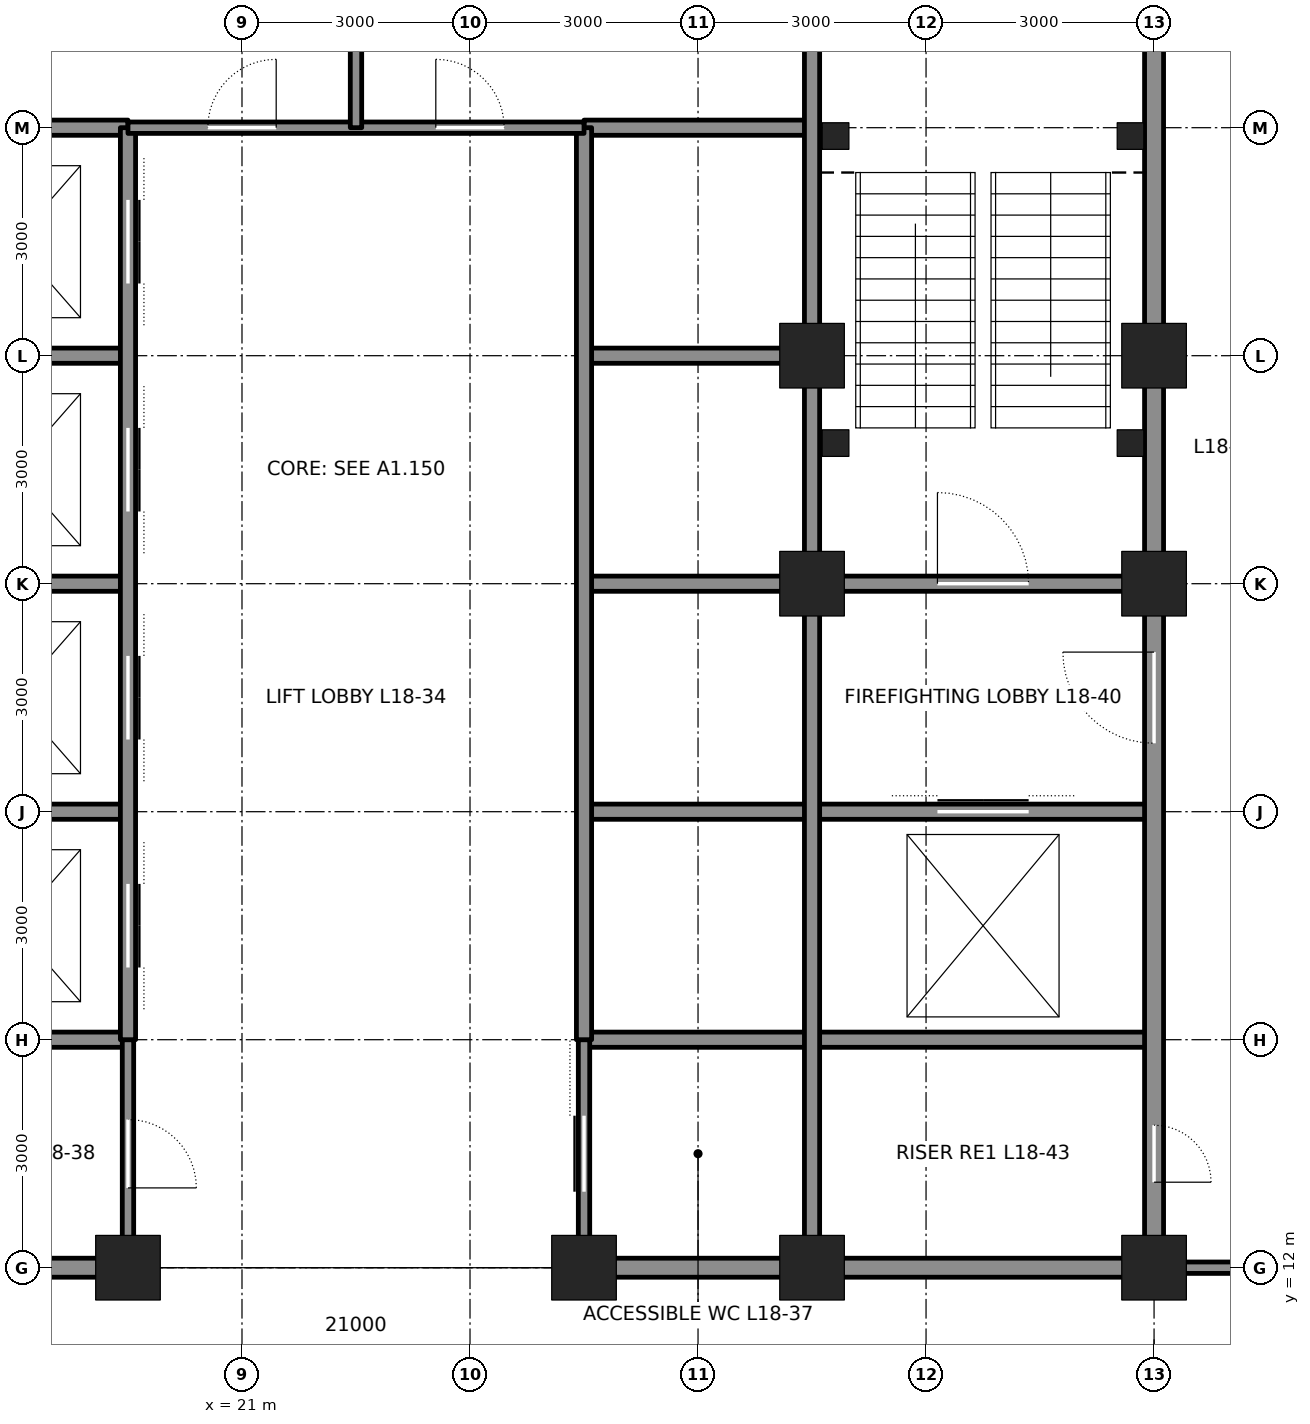
"""IFC4 building model, lengths in metres.
Left out: names, types, materials, properties, quantities, classifications, styles, units other than length and angle.
Written with IfcOpenShell. Run it as: python <this file> out.ifc"""

import sys

from ifc_helpers import new_model, si_unit, direction, frame, frame_2d, origin, origin_2d, place, context, subcontext, project, spatial, rectangle, hollow_rectangle, extrude, element, fill, save


model = new_model("IFC4")
c1 = context("Model", 3, precision=1e-05, world=origin(), true_north=direction((0.0, 1.0)))
c2 = subcontext(c1, "Body", "Model", "MODEL_VIEW")
j1 = project(units=[si_unit("LENGTHUNIT", "METRE"), si_unit("PLANEANGLEUNIT", "RADIAN")], contexts=[c1])
p1 = place(None, origin())
s1 = spatial("IfcSite", under=j1, at=p1, CompositionType="ELEMENT")
p2 = place(p1, origin())
s2 = spatial("IfcBuilding", under=s1, at=p2, CompositionType="ELEMENT")
p3 = place(p2, frame((0.0, 0.0, 87.3)))
s3 = spatial("IfcBuildingStorey", under=s2, at=p3, CompositionType="ELEMENT", Elevation=87.3)
for number, where, z_axis, x_axis in (
    (1, (19.5, 12.0, 0.0), (0.0, 0.0, 1.0), (1.0, 0.0, 0.0)),
    (2, (25.5, 12.0, 0.0), (0.0, 0.0, 1.0), (1.0, 0.0, 0.0)),
    (3, (28.5, 12.0, 0.0), (0.0, 0.0, 1.0), (1.0, 0.0, 0.0)),
    (4, (33.0, 12.0, 0.0), (0.0, 0.0, 1.0), (1.0, 0.0, 0.0)),
    (5, (33.0, 21.0, 0.0), (0.0, 0.0, 1.0), (1.0, 0.0, 0.0)),
    (6, (33.0, 24.0, 0.0), (0.0, 0.0, 1.0), (1.0, 0.0, 0.0)),
    (7, (28.5, 21.0, 0.0), (0.0, 0.0, 1.0), (1.0, 0.0, 0.0)),
    (8, (28.5, 24.0, 0.0), (0.0, 0.0, 1.0), (1.0, 0.0, 0.0)),
):
    element("IfcColumn", number, at=place(p3, frame(where, z_axis=z_axis, x_axis=x_axis)), inside=s3, PredefinedType="COLUMN", context=c2, shape_type="SweptSolid", body=[
        extrude(hollow_rectangle(XDim=0.85, YDim=0.85, WallThickness=0.085, at=origin_2d()), origin(), (0.0, 0.0, 1.0), 4.5),
    ])
for number, where, z_axis, x_axis in (
    (9, (16.75, 12.0, 0.0), (0.0, 0.0, 1.0), (1.0, 0.0, 0.0)),
    (10, (25.75, 12.0, 0.0), (0.0, 0.0, 1.0), (1.0, 0.0, 0.0)),
):
    element("IfcWall", number, at=place(p3, frame(where, z_axis=z_axis, x_axis=x_axis)), inside=s3, PredefinedType="SOLIDWALL", context=c2, shape_type="SweptSolid", body=[
        extrude(rectangle(XDim=2.5, YDim=0.25, at=frame_2d((1.25, 0.0))), origin(), (0.0, 0.0, 1.0), 3.181),
    ])
p4 = place(p3, frame((28.75, 12.0, 0.0), z_axis=(0.0, 0.0, 1.0), x_axis=(1.0, 0.0, 0.0)))
e11 = element("IfcWall", 11, at=p4, inside=s3, PredefinedType="SOLIDWALL", context=c2, shape_type="SweptSolid", body=[
    extrude(rectangle(XDim=4.0, YDim=0.25, at=frame_2d((2.0, 0.0))), origin(), (0.0, 0.0, 1.0), 3.181),
])
for number, where, z_axis, x_axis in (
    (12, (12.0, 15.0, 0.0), (0.0, 0.0, 1.0), (1.0, 0.0, 0.0)),
    (13, (25.5, 15.0, 0.0), (0.0, 0.0, 1.0), (1.0, 0.0, 0.0)),
):
    element("IfcWall", number, at=place(p3, frame(where, z_axis=z_axis, x_axis=x_axis)), inside=s3, PredefinedType="SOLIDWALL", context=c2, shape_type="SweptSolid", body=[
        extrude(rectangle(XDim=7.5, YDim=0.2, at=frame_2d((3.75, 0.0))), origin(), (0.0, 0.0, 1.0), 4.34),
    ])
for number, where, z_axis, x_axis in (
    (14, (16.75, 24.0, 0.0), (0.0, 0.0, 1.0), (1.0, 0.0, 0.0)),
    (15, (25.5, 24.0, 0.0), (0.0, 0.0, 1.0), (1.0, 0.0, 0.0)),
):
    element("IfcWall", number, at=place(p3, frame(where, z_axis=z_axis, x_axis=x_axis)), inside=s3, PredefinedType="SOLIDWALL", context=c2, shape_type="SweptSolid", body=[
        extrude(rectangle(XDim=2.75, YDim=0.2, at=frame_2d((1.375, 0.0))), origin(), (0.0, 0.0, 1.0), 3.39),
    ])
p5 = place(p3, frame((12.0, 27.0, 0.0), z_axis=(0.0, 0.0, 1.0), x_axis=(1.0, 0.0, 0.0)))
e16 = element("IfcWall", 16, at=p5, inside=s3, PredefinedType="SOLIDWALL", context=c2, shape_type="SweptSolid", body=[
    extrude(rectangle(XDim=7.5, YDim=0.2, at=frame_2d((3.75, 0.0))), origin(), (0.0, 0.0, 1.0), 4.34),
])
p6 = place(p5, frame((1.65, 0.0, 0.0)))
e17 = element("IfcOpeningElement", 17, at=p6, cuts=e16, PredefinedType="OPENING", context=c2, shape_type="SweptSolid", body=[
    extrude(rectangle(XDim=1.2, YDim=2.1, at=frame_2d((0.6, 1.05))), frame((0.0, 0.11, 0.0), z_axis=(0.0, -1.0, 0.0), x_axis=(1.0, 0.0, 0.0)), (0.0, 0.0, 1.0), 0.22),
])
for number, where, z_axis, x_axis in (
    (18, (25.5, 27.0, 0.0), (0.0, 0.0, 1.0), (1.0, 0.0, 0.0)),
    (19, (16.5, 18.0, 0.0), (0.0, 0.0, 1.0), (1.0, 0.0, 0.0)),
):
    element("IfcWall", number, at=place(p3, frame(where, z_axis=z_axis, x_axis=x_axis)), inside=s3, PredefinedType="SOLIDWALL", context=c2, shape_type="SweptSolid", body=[
        extrude(rectangle(XDim=3.0, YDim=0.2, at=frame_2d((1.5, 0.0))), origin(), (0.0, 0.0, 1.0), 4.34),
    ])
p7 = place(p3, frame((25.5, 18.0, 0.0), z_axis=(0.0, 0.0, 1.0), x_axis=(1.0, 0.0, 0.0)))
e20 = element("IfcWall", 20, at=p7, inside=s3, PredefinedType="SOLIDWALL", context=c2, shape_type="SweptSolid", body=[
    extrude(rectangle(XDim=7.5, YDim=0.2, at=frame_2d((3.75, 0.0))), origin(), (0.0, 0.0, 1.0), 4.34),
])
p8 = place(p7, frame((4.65, 0.0, 0.0)))
e21 = element("IfcOpeningElement", 21, at=p8, cuts=e20, PredefinedType="OPENING", context=c2, shape_type="SweptSolid", body=[
    extrude(rectangle(XDim=1.2, YDim=2.1, at=frame_2d((0.6, 1.05))), frame((0.0, 0.11, 0.0), z_axis=(0.0, -1.0, 0.0), x_axis=(1.0, 0.0, 0.0)), (0.0, 0.0, 1.0), 0.22),
])
for number, where, z_axis, x_axis in (
    (22, (16.75, 21.0, 0.0), (0.0, 0.0, 1.0), (1.0, 0.0, 0.0)),
    (23, (25.5, 21.0, 0.0), (0.0, 0.0, 1.0), (1.0, 0.0, 0.0)),
):
    element("IfcWall", number, at=place(p3, frame(where, z_axis=z_axis, x_axis=x_axis)), inside=s3, PredefinedType="SOLIDWALL", context=c2, shape_type="SweptSolid", body=[
        extrude(rectangle(XDim=2.75, YDim=0.2, at=frame_2d((1.375, 0.0))), origin(), (0.0, 0.0, 1.0), 3.39),
    ])
p9 = place(p3, frame((28.75, 21.0, 0.0), z_axis=(0.0, 0.0, 1.0), x_axis=(1.0, 0.0, 0.0)))
e24 = element("IfcWall", 24, at=p9, inside=s3, PredefinedType="SOLIDWALL", context=c2, shape_type="SweptSolid", body=[
    extrude(rectangle(XDim=4.0, YDim=0.2, at=frame_2d((2.0, 0.0))), origin(), (0.0, 0.0, 1.0), 3.39),
])
p10 = place(p9, frame((1.4, 0.0, 0.0)))
e25 = element("IfcOpeningElement", 25, at=p10, cuts=e24, PredefinedType="OPENING", context=c2, shape_type="SweptSolid", body=[
    extrude(rectangle(XDim=1.2, YDim=2.1, at=frame_2d((0.6, 1.05))), frame((0.0, 0.11, 0.0), z_axis=(0.0, -1.0, 0.0), x_axis=(1.0, 0.0, 0.0)), (0.0, 0.0, 1.0), 0.22),
])
p11 = place(p3, frame((19.5, 12.25, 0.0), z_axis=(0.0, 0.0, 1.0), x_axis=(0.0, 1.0, 0.0)))
e26 = element("IfcWall", 26, at=p11, inside=s3, PredefinedType="PARTITIONING", context=c2, shape_type="SweptSolid", body=[
    extrude(rectangle(XDim=2.75, YDim=0.15, at=frame_2d((1.375, 0.0))), origin(), (0.0, 0.0, 1.0), 3.365),
])
p12 = place(p11, frame((0.8, 0.0, 0.0)))
e27 = element("IfcOpeningElement", 27, at=p12, cuts=e26, PredefinedType="OPENING", context=c2, shape_type="SweptSolid", body=[
    extrude(rectangle(XDim=0.9, YDim=2.1, at=frame_2d((0.45, 1.05))), frame((0.0, 0.085, 0.0), z_axis=(0.0, -1.0, 0.0), x_axis=(1.0, 0.0, 0.0)), (0.0, 0.0, 1.0), 0.17),
])
p13 = place(p3, frame((19.5, 15.0, 0.0), z_axis=(0.0, 0.0, 1.0), x_axis=(0.0, 1.0, 0.0)))
e28 = element("IfcWall", 28, at=p13, inside=s3, PredefinedType="SOLIDWALL", context=c2, shape_type="SweptSolid", body=[
    extrude(rectangle(XDim=12.0, YDim=0.2, at=frame_2d((6.0, 0.0))), origin(), (0.0, 0.0, 1.0), 3.365),
])
p14 = place(p13, frame((0.95, 0.0, 0.0)))
e29 = element("IfcOpeningElement", 29, at=p14, cuts=e28, PredefinedType="OPENING", context=c2, shape_type="SweptSolid", body=[
    extrude(rectangle(XDim=1.1, YDim=2.1, at=frame_2d((0.55, 1.05))), frame((0.0, 0.11, 0.0), z_axis=(0.0, -1.0, 0.0), x_axis=(1.0, 0.0, 0.0)), (0.0, 0.0, 1.0), 0.22),
])
p15 = place(p13, frame((3.95, 0.0, 0.0)))
e30 = element("IfcOpeningElement", 30, at=p15, cuts=e28, PredefinedType="OPENING", context=c2, shape_type="SweptSolid", body=[
    extrude(rectangle(XDim=1.1, YDim=2.1, at=frame_2d((0.55, 1.05))), frame((0.0, 0.11, 0.0), z_axis=(0.0, -1.0, 0.0), x_axis=(1.0, 0.0, 0.0)), (0.0, 0.0, 1.0), 0.22),
])
p16 = place(p13, frame((6.95, 0.0, 0.0)))
e31 = element("IfcOpeningElement", 31, at=p16, cuts=e28, PredefinedType="OPENING", context=c2, shape_type="SweptSolid", body=[
    extrude(rectangle(XDim=1.1, YDim=2.1, at=frame_2d((0.55, 1.05))), frame((0.0, 0.11, 0.0), z_axis=(0.0, -1.0, 0.0), x_axis=(1.0, 0.0, 0.0)), (0.0, 0.0, 1.0), 0.22),
])
p17 = place(p13, frame((9.95, 0.0, 0.0)))
e32 = element("IfcOpeningElement", 32, at=p17, cuts=e28, PredefinedType="OPENING", context=c2, shape_type="SweptSolid", body=[
    extrude(rectangle(XDim=1.1, YDim=2.1, at=frame_2d((0.55, 1.05))), frame((0.0, 0.11, 0.0), z_axis=(0.0, -1.0, 0.0), x_axis=(1.0, 0.0, 0.0)), (0.0, 0.0, 1.0), 0.22),
])
p18 = place(p3, frame((25.5, 12.25, 0.0), z_axis=(0.0, 0.0, 1.0), x_axis=(0.0, 1.0, 0.0)))
e33 = element("IfcWall", 33, at=p18, inside=s3, PredefinedType="PARTITIONING", context=c2, shape_type="SweptSolid", body=[
    extrude(rectangle(XDim=2.75, YDim=0.15, at=frame_2d((1.375, 0.0))), origin(), (0.0, 0.0, 1.0), 3.365),
])
p19 = place(p18, frame((0.75, 0.0, 0.0)))
e34 = element("IfcOpeningElement", 34, at=p19, cuts=e33, PredefinedType="OPENING", context=c2, shape_type="SweptSolid", body=[
    extrude(rectangle(XDim=1.0, YDim=2.1, at=frame_2d((0.5, 1.05))), frame((0.0, 0.085, 0.0), z_axis=(0.0, -1.0, 0.0), x_axis=(1.0, 0.0, 0.0)), (0.0, 0.0, 1.0), 0.17),
])
p20 = place(p3, frame((25.5, 15.0, 0.0), z_axis=(0.0, 0.0, 1.0), x_axis=(0.0, 1.0, 0.0)))
e35 = element("IfcWall", 35, at=p20, inside=s3, PredefinedType="SOLIDWALL", context=c2, shape_type="SweptSolid", body=[
    extrude(rectangle(XDim=12.0, YDim=0.2, at=frame_2d((6.0, 0.0))), origin(), (0.0, 0.0, 1.0), 3.365),
])
p21 = place(p3, frame((28.5, 12.25, 0.0), z_axis=(0.0, 0.0, 1.0), x_axis=(0.0, 1.0, 0.0)))
e36 = element("IfcWall", 36, at=p21, inside=s3, PredefinedType="SOLIDWALL", context=c2, shape_type="SweptSolid", body=[
    extrude(rectangle(XDim=8.5, YDim=0.2, at=frame_2d((4.25, 0.0))), origin(), (0.0, 0.0, 1.0), 3.413),
])
p22 = place(p3, frame((28.5, 21.25, 0.0), z_axis=(0.0, 0.0, 1.0), x_axis=(0.0, 1.0, 0.0)))
e37 = element("IfcWall", 37, at=p22, inside=s3, PredefinedType="SOLIDWALL", context=c2, shape_type="SweptSolid", body=[
    extrude(rectangle(XDim=2.5, YDim=0.2, at=frame_2d((1.25, 0.0))), origin(), (0.0, 0.0, 1.0), 3.413),
])
p23 = place(p3, frame((28.5, 24.25, 0.0), z_axis=(0.0, 0.0, 1.0), x_axis=(0.0, 1.0, 0.0)))
e38 = element("IfcWall", 38, at=p23, inside=s3, PredefinedType="SOLIDWALL", context=c2, shape_type="SweptSolid", body=[
    extrude(rectangle(XDim=8.5, YDim=0.2, at=frame_2d((4.25, 0.0))), origin(), (0.0, 0.0, 1.0), 3.413),
])
p24 = place(p3, frame((33.0, 12.25, 0.0), z_axis=(0.0, 0.0, 1.0), x_axis=(0.0, 1.0, 0.0)))
e39 = element("IfcWall", 39, at=p24, inside=s3, PredefinedType="SOLIDWALL", context=c2, shape_type="SweptSolid", body=[
    extrude(rectangle(XDim=8.5, YDim=0.25, at=frame_2d((4.25, 0.0))), origin(), (0.0, 0.0, 1.0), 3.113),
])
p25 = place(p24, frame((6.65, 0.0, 0.0)))
e40 = element("IfcOpeningElement", 40, at=p25, cuts=e39, PredefinedType="OPENING", context=c2, shape_type="SweptSolid", body=[
    extrude(rectangle(XDim=1.2, YDim=2.1, at=frame_2d((0.6, 1.05))), frame((0.0, 0.135, 0.0), z_axis=(0.0, -1.0, 0.0), x_axis=(1.0, 0.0, 0.0)), (0.0, 0.0, 1.0), 0.27),
])
p26 = place(p24, frame((0.875, 0.0, 0.0)))
e41 = element("IfcOpeningElement", 41, at=p26, cuts=e39, PredefinedType="OPENING", context=c2, shape_type="SweptSolid", body=[
    extrude(rectangle(XDim=0.75, YDim=2.1, at=frame_2d((0.375, 1.05))), frame((0.0, 0.135, 0.0), z_axis=(0.0, -1.0, 0.0), x_axis=(1.0, 0.0, 0.0)), (0.0, 0.0, 1.0), 0.27),
])
p27 = place(p3, frame((33.0, 21.25, 0.0), z_axis=(0.0, 0.0, 1.0), x_axis=(0.0, 1.0, 0.0)))
e42 = element("IfcWall", 42, at=p27, inside=s3, PredefinedType="SOLIDWALL", context=c2, shape_type="SweptSolid", body=[
    extrude(rectangle(XDim=2.5, YDim=0.25, at=frame_2d((1.25, 0.0))), origin(), (0.0, 0.0, 1.0), 3.113),
])
p28 = place(p3, frame((33.0, 24.25, 0.0), z_axis=(0.0, 0.0, 1.0), x_axis=(0.0, 1.0, 0.0)))
e43 = element("IfcWall", 43, at=p28, inside=s3, PredefinedType="SOLIDWALL", context=c2, shape_type="SweptSolid", body=[
    extrude(rectangle(XDim=8.5, YDim=0.25, at=frame_2d((4.25, 0.0))), origin(), (0.0, 0.0, 1.0), 3.113),
])
p29 = place(p28, frame((6.875, 0.0, 0.0)))
e44 = element("IfcOpeningElement", 44, at=p29, cuts=e43, PredefinedType="OPENING", context=c2, shape_type="SweptSolid", body=[
    extrude(rectangle(XDim=0.75, YDim=2.1, at=frame_2d((0.375, 1.05))), frame((0.0, 0.135, 0.0), z_axis=(0.0, -1.0, 0.0), x_axis=(1.0, 0.0, 0.0)), (0.0, 0.0, 1.0), 0.27),
])
p30 = place(p3, frame((19.5, 27.0, 0.0), z_axis=(0.0, 0.0, 1.0), x_axis=(1.0, 0.0, 0.0)))
e45 = element("IfcWall", 45, at=p30, inside=s3, PredefinedType="PARTITIONING", context=c2, shape_type="SweptSolid", body=[
    extrude(rectangle(XDim=6.0, YDim=0.15, at=frame_2d((3.0, 0.0))), origin(), (0.0, 0.0, 1.0), 4.34),
])
p31 = place(p30, frame((1.05, 0.0, 0.0)))
e46 = element("IfcOpeningElement", 46, at=p31, cuts=e45, PredefinedType="OPENING", context=c2, shape_type="SweptSolid", body=[
    extrude(rectangle(XDim=0.9, YDim=2.1, at=frame_2d((0.45, 1.05))), frame((0.0, 0.085, 0.0), z_axis=(0.0, -1.0, 0.0), x_axis=(1.0, 0.0, 0.0)), (0.0, 0.0, 1.0), 0.17),
])
p32 = place(p30, frame((4.05, 0.0, 0.0)))
e47 = element("IfcOpeningElement", 47, at=p32, cuts=e45, PredefinedType="OPENING", context=c2, shape_type="SweptSolid", body=[
    extrude(rectangle(XDim=0.9, YDim=2.1, at=frame_2d((0.45, 1.05))), frame((0.0, 0.085, 0.0), z_axis=(0.0, -1.0, 0.0), x_axis=(1.0, 0.0, 0.0)), (0.0, 0.0, 1.0), 0.17),
])
p33 = place(p3, frame((22.5, 27.0, 0.0), z_axis=(0.0, 0.0, 1.0), x_axis=(0.0, 1.0, 0.0)))
e48 = element("IfcWall", 48, at=p33, inside=s3, PredefinedType="PARTITIONING", context=c2, shape_type="SweptSolid", body=[
    extrude(rectangle(XDim=6.0, YDim=0.15, at=frame_2d((3.0, 0.0))), origin(), (0.0, 0.0, 1.0), 4.34),
])
p34 = place(p3, frame((33.0, 12.0, -0.3), z_axis=(0.0, 0.0, 1.0), x_axis=(1.0, 0.0, 0.0)))
e49 = element("IfcWall", 49, at=p34, inside=s3, PredefinedType="PARTITIONING", context=c2, shape_type="SweptSolid", body=[
    extrude(rectangle(XDim=1.8, YDim=0.15, at=frame_2d((0.9, 0.0))), origin(), (0.0, 0.0, 1.0), 3.481),
])
for number, where, z_axis, x_axis in (
    (50, (28.81, 26.89, 0.0), (0.0, 0.0, 1.0), (1.0, 0.0, 0.0)),
    (51, (32.69, 26.89, 0.0), (0.0, 0.0, 1.0), (1.0, 0.0, 0.0)),
    (52, (28.81, 22.85, 0.0), (0.0, 0.0, 1.0), (1.0, 0.0, 0.0)),
    (53, (32.69, 22.85, 0.0), (0.0, 0.0, 1.0), (1.0, 0.0, 0.0)),
):
    element("IfcColumn", number, at=place(p3, frame(where, z_axis=z_axis, x_axis=x_axis)), inside=s3, PredefinedType="COLUMN", context=c2, shape_type="SweptSolid", body=[
        extrude(hollow_rectangle(XDim=0.35, YDim=0.35, WallThickness=0.035, at=origin_2d()), origin(), (0.0, 0.0, 1.0), 4.5),
    ])
p35 = place(p10, origin())
e54 = element("IfcDoor", 54, at=p35, inside=s3, OperationType="SINGLE_SWING_LEFT", PredefinedType="DOOR", context=c2, shape_type="SweptSolid", body=[
    extrude(rectangle(XDim=1.2, YDim=2.1, at=frame_2d((0.6, 1.05))), frame((0.0, 0.025, 0.0), z_axis=(0.0, -1.0, 0.0), x_axis=(1.0, 0.0, 0.0)), (0.0, 0.0, 1.0), 0.05),
])
fill(e25, e54)
p36 = place(p25, origin())
e55 = element("IfcDoor", 55, at=p36, inside=s3, OperationType="SINGLE_SWING_RIGHT", PredefinedType="DOOR", context=c2, shape_type="SweptSolid", body=[
    extrude(rectangle(XDim=1.2, YDim=2.1, at=frame_2d((0.6, 1.05))), frame((0.0, 0.025, 0.0), z_axis=(0.0, -1.0, 0.0), x_axis=(1.0, 0.0, 0.0)), (0.0, 0.0, 1.0), 0.05),
])
fill(e40, e55)
p37 = place(p8, origin())
e56 = element("IfcDoor", 56, at=p37, inside=s3, OperationType="DOUBLE_DOOR_SLIDING", PredefinedType="DOOR", context=c2, shape_type="SweptSolid", body=[
    extrude(rectangle(XDim=1.2, YDim=2.1, at=frame_2d((0.6, 1.05))), frame((0.0, 0.025, 0.0), z_axis=(0.0, -1.0, 0.0), x_axis=(1.0, 0.0, 0.0)), (0.0, 0.0, 1.0), 0.05),
])
fill(e21, e56)
p38 = place(p26, frame((0.75, 0.0, 0.0), z_axis=(0.0, 0.0, 1.0), x_axis=(-1.0, 0.0, 0.0)))
e57 = element("IfcDoor", 57, at=p38, inside=s3, OperationType="SINGLE_SWING_RIGHT", PredefinedType="DOOR", context=c2, shape_type="SweptSolid", body=[
    extrude(rectangle(XDim=0.75, YDim=2.1, at=frame_2d((0.375, 1.05))), frame((0.0, 0.025, 0.0), z_axis=(0.0, -1.0, 0.0), x_axis=(1.0, 0.0, 0.0)), (0.0, 0.0, 1.0), 0.05),
])
fill(e41, e57)
p39 = place(p31, origin())
e58 = element("IfcDoor", 58, at=p39, inside=s3, OperationType="SINGLE_SWING_RIGHT", PredefinedType="DOOR", context=c2, shape_type="SweptSolid", body=[
    extrude(rectangle(XDim=0.9, YDim=2.1, at=frame_2d((0.45, 1.05))), frame((0.0, 0.025, 0.0), z_axis=(0.0, -1.0, 0.0), x_axis=(1.0, 0.0, 0.0)), (0.0, 0.0, 1.0), 0.05),
])
fill(e46, e58)
p40 = place(p32, origin())
e59 = element("IfcDoor", 59, at=p40, inside=s3, OperationType="SINGLE_SWING_LEFT", PredefinedType="DOOR", context=c2, shape_type="SweptSolid", body=[
    extrude(rectangle(XDim=0.9, YDim=2.1, at=frame_2d((0.45, 1.05))), frame((0.0, 0.025, 0.0), z_axis=(0.0, -1.0, 0.0), x_axis=(1.0, 0.0, 0.0)), (0.0, 0.0, 1.0), 0.05),
])
fill(e47, e59)
p41 = place(p19, origin())
e60 = element("IfcDoor", 60, at=p41, inside=s3, OperationType="SLIDING_TO_LEFT", PredefinedType="DOOR", context=c2, shape_type="SweptSolid", body=[
    extrude(rectangle(XDim=1.0, YDim=2.1, at=frame_2d((0.5, 1.05))), frame((0.0, 0.025, 0.0), z_axis=(0.0, -1.0, 0.0), x_axis=(1.0, 0.0, 0.0)), (0.0, 0.0, 1.0), 0.05),
])
fill(e34, e60)
p42 = place(p12, frame((0.9, 0.0, 0.0), z_axis=(0.0, 0.0, 1.0), x_axis=(-1.0, 0.0, 0.0)))
e61 = element("IfcDoor", 61, at=p42, inside=s3, OperationType="SINGLE_SWING_RIGHT", PredefinedType="DOOR", context=c2, shape_type="SweptSolid", body=[
    extrude(rectangle(XDim=0.9, YDim=2.1, at=frame_2d((0.45, 1.05))), frame((0.0, 0.025, 0.0), z_axis=(0.0, -1.0, 0.0), x_axis=(1.0, 0.0, 0.0)), (0.0, 0.0, 1.0), 0.05),
])
fill(e27, e61)
p43 = place(p14, origin())
e62 = element("IfcDoor", 62, at=p43, inside=s3, OperationType="DOUBLE_DOOR_SLIDING", PredefinedType="DOOR", context=c2, shape_type="SweptSolid", body=[
    extrude(rectangle(XDim=1.1, YDim=2.1, at=frame_2d((0.55, 1.05))), frame((0.0, 0.025, 0.0), z_axis=(0.0, -1.0, 0.0), x_axis=(1.0, 0.0, 0.0)), (0.0, 0.0, 1.0), 0.05),
])
fill(e29, e62)
p44 = place(p15, origin())
e63 = element("IfcDoor", 63, at=p44, inside=s3, OperationType="DOUBLE_DOOR_SLIDING", PredefinedType="DOOR", context=c2, shape_type="SweptSolid", body=[
    extrude(rectangle(XDim=1.1, YDim=2.1, at=frame_2d((0.55, 1.05))), frame((0.0, 0.025, 0.0), z_axis=(0.0, -1.0, 0.0), x_axis=(1.0, 0.0, 0.0)), (0.0, 0.0, 1.0), 0.05),
])
fill(e30, e63)
p45 = place(p16, origin())
e64 = element("IfcDoor", 64, at=p45, inside=s3, OperationType="DOUBLE_DOOR_SLIDING", PredefinedType="DOOR", context=c2, shape_type="SweptSolid", body=[
    extrude(rectangle(XDim=1.1, YDim=2.1, at=frame_2d((0.55, 1.05))), frame((0.0, 0.025, 0.0), z_axis=(0.0, -1.0, 0.0), x_axis=(1.0, 0.0, 0.0)), (0.0, 0.0, 1.0), 0.05),
])
fill(e31, e64)
p46 = place(p17, origin())
e65 = element("IfcDoor", 65, at=p46, inside=s3, OperationType="DOUBLE_DOOR_SLIDING", PredefinedType="DOOR", context=c2, shape_type="SweptSolid", body=[
    extrude(rectangle(XDim=1.1, YDim=2.1, at=frame_2d((0.55, 1.05))), frame((0.0, 0.025, 0.0), z_axis=(0.0, -1.0, 0.0), x_axis=(1.0, 0.0, 0.0)), (0.0, 0.0, 1.0), 0.05),
])
fill(e32, e65)
save(model, sys.argv[1])
